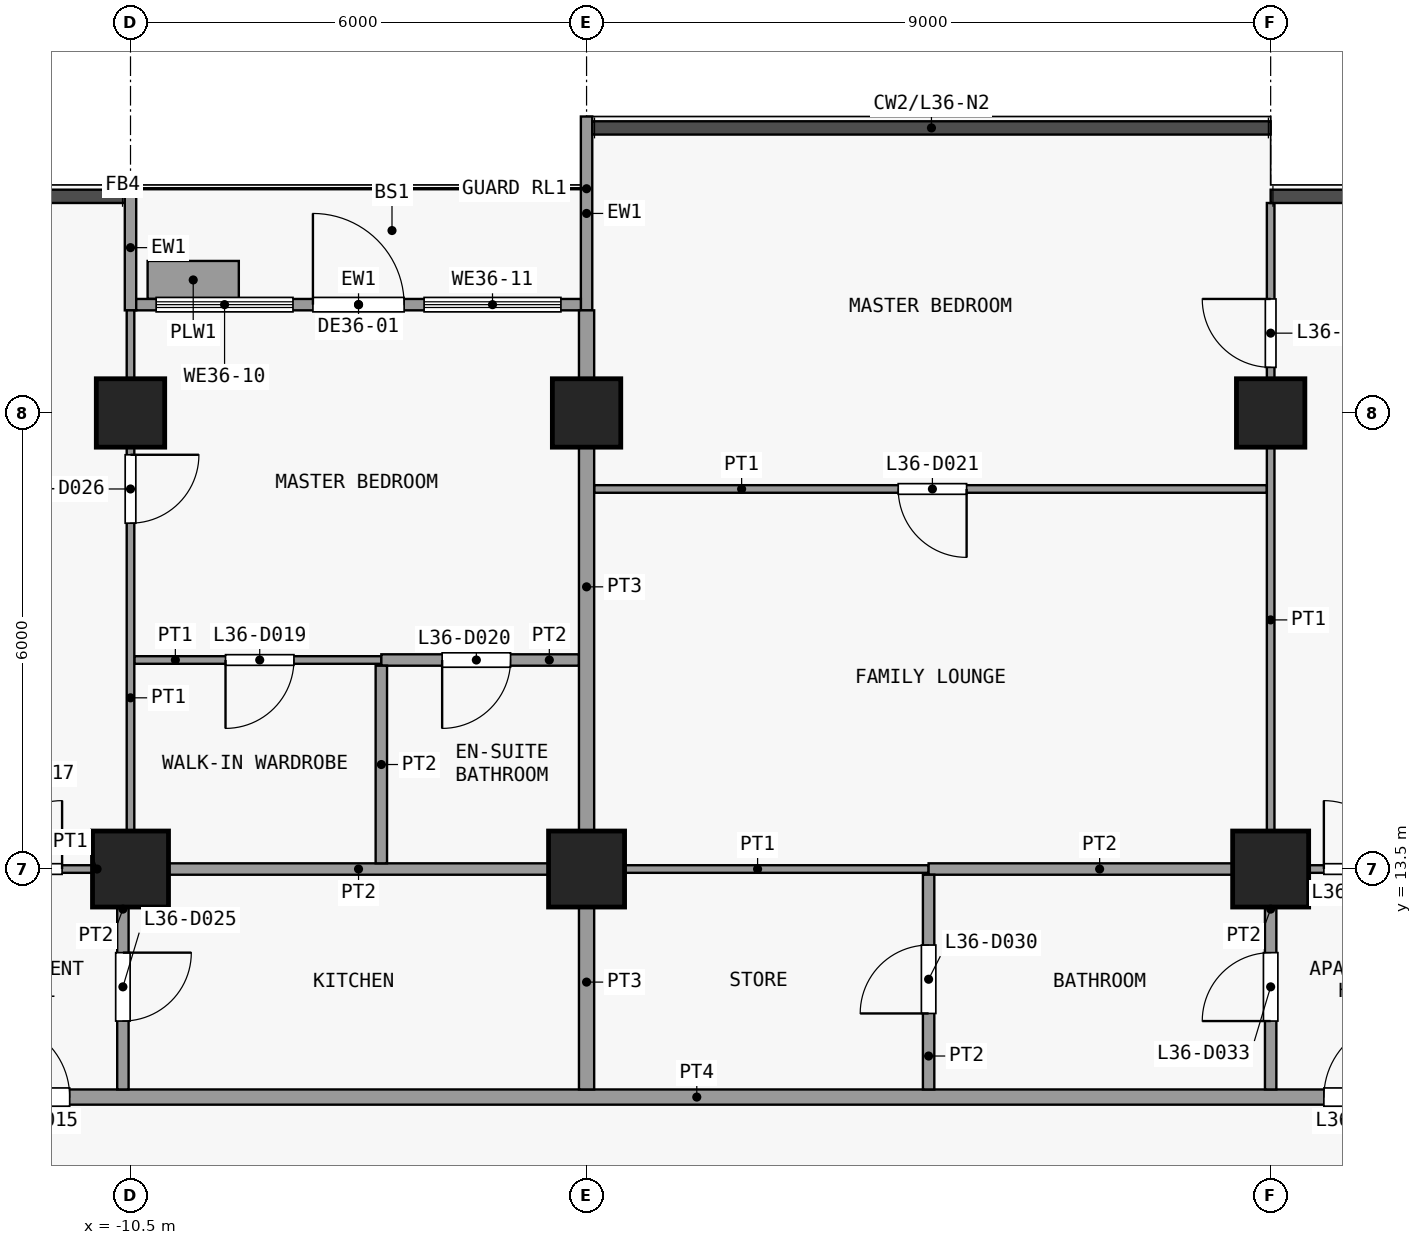
"""IFC4 building model, lengths in metres.
Left out: names, types, materials, properties, quantities, classifications, styles, units other than length and angle.
Written with IfcOpenShell. Run it as: python <this file> out.ifc"""

import sys

from ifc_helpers import new_model, si_unit, direction, frame, frame_2d, origin, origin_2d, place, context, subcontext, project, spatial, rectangle, extrude, element, fill, save


model = new_model("IFC4")
c1 = context("Model", 3, precision=1e-05, world=origin(), true_north=direction((0.0, 1.0)))
c2 = subcontext(c1, "Body", "Model", "MODEL_VIEW")
j1 = project(units=[si_unit("LENGTHUNIT", "METRE"), si_unit("PLANEANGLEUNIT", "RADIAN")], contexts=[c1])
p1 = place(None, origin())
s1 = spatial("IfcSite", under=j1, at=p1, CompositionType="ELEMENT")
p2 = place(p1, origin())
s2 = spatial("IfcBuilding", under=s1, at=p2, CompositionType="ELEMENT")
p3 = place(p2, frame((0.0, 0.0, 149.3)))
s3 = spatial("IfcBuildingStorey", under=s2, at=p3, CompositionType="ELEMENT", Elevation=149.3)
p4 = place(p3, frame((-10.5, 13.5, 0.0), z_axis=(0.0, 0.0, 1.0), x_axis=(1.0, 0.0, 0.0)))
e1 = element("IfcColumn", 1, at=p4, inside=s3, PredefinedType="COLUMN", context=c2, shape_type="SweptSolid", body=[
    extrude(rectangle(XDim=1.0, YDim=1.0, at=origin_2d()), origin(), (0.0, 0.0, 1.0), 3.6),
])
p5 = place(p3, frame((-10.5, 19.5, 0.0), z_axis=(0.0, 0.0, 1.0), x_axis=(1.0, 0.0, 0.0)))
e2 = element("IfcColumn", 2, at=p5, inside=s3, PredefinedType="COLUMN", context=c2, shape_type="SweptSolid", body=[
    extrude(rectangle(XDim=0.9, YDim=0.9, at=origin_2d()), origin(), (0.0, 0.0, 1.0), 3.6),
])
p6 = place(p3, frame((-4.5, 13.5, 0.0), z_axis=(0.0, 0.0, 1.0), x_axis=(1.0, 0.0, 0.0)))
e3 = element("IfcColumn", 3, at=p6, inside=s3, PredefinedType="COLUMN", context=c2, shape_type="SweptSolid", body=[
    extrude(rectangle(XDim=1.0, YDim=1.0, at=origin_2d()), origin(), (0.0, 0.0, 1.0), 3.6),
])
p7 = place(p3, frame((-4.5, 19.5, 0.0), z_axis=(0.0, 0.0, 1.0), x_axis=(1.0, 0.0, 0.0)))
e4 = element("IfcColumn", 4, at=p7, inside=s3, PredefinedType="COLUMN", context=c2, shape_type="SweptSolid", body=[
    extrude(rectangle(XDim=0.9, YDim=0.9, at=origin_2d()), origin(), (0.0, 0.0, 1.0), 3.6),
])
p8 = place(p3, frame((4.5, 13.5, 0.0), z_axis=(0.0, 0.0, 1.0), x_axis=(1.0, 0.0, 0.0)))
e5 = element("IfcColumn", 5, at=p8, inside=s3, PredefinedType="COLUMN", context=c2, shape_type="SweptSolid", body=[
    extrude(rectangle(XDim=1.0, YDim=1.0, at=origin_2d()), origin(), (0.0, 0.0, 1.0), 3.6),
])
p9 = place(p3, frame((4.5, 19.5, 0.0), z_axis=(0.0, 0.0, 1.0), x_axis=(1.0, 0.0, 0.0)))
e6 = element("IfcColumn", 6, at=p9, inside=s3, PredefinedType="COLUMN", context=c2, shape_type="SweptSolid", body=[
    extrude(rectangle(XDim=0.9, YDim=0.9, at=origin_2d()), origin(), (0.0, 0.0, 1.0), 3.6),
])
p10 = place(p3, frame((-10.5, 20.85, 0.0), z_axis=(0.0, 0.0, 1.0), x_axis=(0.0, 1.0, 0.0)))
e7 = element("IfcWall", 7, at=p10, inside=s3, PredefinedType="SOLIDWALL", context=c2, shape_type="SweptSolid", body=[
    extrude(rectangle(XDim=1.65, YDim=0.15, at=frame_2d((0.825, 0.0))), origin(), (0.0, 0.0, 1.0), 3.3),
])
p11 = place(p3, frame((-4.5, 20.85, 0.0), z_axis=(0.0, 0.0, 1.0), x_axis=(0.0, 1.0, 0.0)))
e8 = element("IfcWall", 8, at=p11, inside=s3, PredefinedType="SOLIDWALL", context=c2, shape_type="SweptSolid", body=[
    extrude(rectangle(XDim=2.55, YDim=0.15, at=frame_2d((1.275, 0.0))), origin(), (0.0, 0.0, 1.0), 3.3),
])
p12 = place(p3, frame((-10.425, 20.925, 0.0), z_axis=(0.0, 0.0, 1.0), x_axis=(1.0, 0.0, 0.0)))
e9 = element("IfcWall", 9, at=p12, inside=s3, PredefinedType="SOLIDWALL", context=c2, shape_type="SweptSolid", body=[
    extrude(rectangle(XDim=5.85, YDim=0.15, at=frame_2d((2.925, 0.0))), origin(), (0.0, 0.0, 1.0), 3.3),
])
p13 = place(p12, frame((2.325, 0.0, 0.0)))
e10 = element("IfcOpeningElement", 10, at=p13, cuts=e9, PredefinedType="OPENING", context=c2, shape_type="SweptSolid", body=[
    extrude(rectangle(XDim=1.2, YDim=2.4, at=frame_2d((0.6, 1.2))), frame((0.0, 0.085, 0.0), z_axis=(0.0, -1.0, 0.0), x_axis=(1.0, 0.0, 0.0)), (0.0, 0.0, 1.0), 0.17),
])
p14 = place(p12, frame((0.262, 0.0, 0.9)))
e11 = element("IfcOpeningElement", 11, at=p14, cuts=e9, PredefinedType="OPENING", context=c2, shape_type="SweptSolid", body=[
    extrude(rectangle(XDim=1.8, YDim=2.1, at=frame_2d((0.9, 1.05))), frame((0.0, 0.085, 0.0), z_axis=(0.0, -1.0, 0.0), x_axis=(1.0, 0.0, 0.0)), (0.0, 0.0, 1.0), 0.17),
])
p15 = place(p12, frame((3.788, 0.0, 0.9)))
e12 = element("IfcOpeningElement", 12, at=p15, cuts=e9, PredefinedType="OPENING", context=c2, shape_type="SweptSolid", body=[
    extrude(rectangle(XDim=1.8, YDim=2.1, at=frame_2d((0.9, 1.05))), frame((0.0, 0.085, 0.0), z_axis=(0.0, -1.0, 0.0), x_axis=(1.0, 0.0, 0.0)), (0.0, 0.0, 1.0), 0.17),
])
p16 = place(p3, frame((-10.275, 21.25, 0.0), z_axis=(0.0, 0.0, 1.0), x_axis=(1.0, 0.0, 0.0)))
e13 = element("IfcWall", 13, at=p16, inside=s3, PredefinedType="USERDEFINED", context=c2, shape_type="SweptSolid", body=[
    extrude(rectangle(XDim=1.2, YDim=0.5, at=frame_2d((0.6, 0.0))), origin(), (0.0, 0.0, 1.0), 0.9),
])
p17 = place(p3, frame((-17.85, 10.5, 0.0), z_axis=(0.0, 0.0, 1.0), x_axis=(1.0, 0.0, 0.0)))
e14 = element("IfcWall", 14, at=p17, inside=s3, PredefinedType="PARTITIONING", context=c2, shape_type="SweptSolid", body=[
    extrude(rectangle(XDim=37.2, YDim=0.2, at=frame_2d((18.6, 0.0))), origin(), (0.0, 0.0, 1.0), 3.3),
])
p18 = place(p17, frame((5.55, 0.0, 0.0)))
e15 = element("IfcOpeningElement", 15, at=p18, cuts=e14, PredefinedType="OPENING", context=c2, shape_type="SweptSolid", body=[
    extrude(rectangle(XDim=1.0, YDim=2.1, at=frame_2d((0.5, 1.05))), frame((0.0, 0.11, 0.0), z_axis=(0.0, -1.0, 0.0), x_axis=(1.0, 0.0, 0.0)), (0.0, 0.0, 1.0), 0.22),
])
p19 = place(p17, frame((23.05, 0.0, 0.0)))
e16 = element("IfcOpeningElement", 16, at=p19, cuts=e14, PredefinedType="OPENING", context=c2, shape_type="SweptSolid", body=[
    extrude(rectangle(XDim=1.0, YDim=2.1, at=frame_2d((0.5, 1.05))), frame((0.0, 0.11, 0.0), z_axis=(0.0, -1.0, 0.0), x_axis=(1.0, 0.0, 0.0)), (0.0, 0.0, 1.0), 0.22),
])
p20 = place(p3, frame((-13.0, 13.5, 0.0), z_axis=(0.0, 0.0, 1.0), x_axis=(1.0, 0.0, 0.0)))
e17 = element("IfcWall", 17, at=p20, inside=s3, PredefinedType="PARTITIONING", context=c2, shape_type="SweptSolid", body=[
    extrude(rectangle(XDim=2.4, YDim=0.1, at=frame_2d((1.2, 0.0))), origin(), (0.0, 0.0, 1.0), 3.3),
])
p21 = place(p20, frame((0.7, 0.0, 0.0)))
e18 = element("IfcOpeningElement", 18, at=p21, cuts=e17, PredefinedType="OPENING", context=c2, shape_type="SweptSolid", body=[
    extrude(rectangle(XDim=0.9, YDim=2.1, at=frame_2d((0.45, 1.05))), frame((0.0, 0.06, 0.0), z_axis=(0.0, -1.0, 0.0), x_axis=(1.0, 0.0, 0.0)), (0.0, 0.0, 1.0), 0.12),
])
p22 = place(p3, frame((-4.5, 13.5, 0.0), z_axis=(0.0, 0.0, 1.0), x_axis=(1.0, 0.0, 0.0)))
e19 = element("IfcWall", 19, at=p22, inside=s3, PredefinedType="PARTITIONING", context=c2, shape_type="SweptSolid", body=[
    extrude(rectangle(XDim=4.5, YDim=0.1, at=frame_2d((2.25, 0.0))), origin(), (0.0, 0.0, 1.0), 3.3),
])
p23 = place(p3, frame((4.5, 13.5, 0.0), z_axis=(0.0, 0.0, 1.0), x_axis=(1.0, 0.0, 0.0)))
e20 = element("IfcWall", 20, at=p23, inside=s3, PredefinedType="PARTITIONING", context=c2, shape_type="SweptSolid", body=[
    extrude(rectangle(XDim=2.4, YDim=0.1, at=frame_2d((1.2, 0.0))), origin(), (0.0, 0.0, 1.0), 3.3),
])
p24 = place(p23, frame((0.7, 0.0, 0.0)))
e21 = element("IfcOpeningElement", 21, at=p24, cuts=e20, PredefinedType="OPENING", context=c2, shape_type="SweptSolid", body=[
    extrude(rectangle(XDim=0.9, YDim=2.1, at=frame_2d((0.45, 1.05))), frame((0.0, 0.06, 0.0), z_axis=(0.0, -1.0, 0.0), x_axis=(1.0, 0.0, 0.0)), (0.0, 0.0, 1.0), 0.12),
])
p25 = place(p3, frame((-10.5, 13.5, 0.0), z_axis=(0.0, 0.0, 1.0), x_axis=(1.0, 0.0, 0.0)))
e22 = element("IfcWall", 22, at=p25, inside=s3, PredefinedType="PARTITIONING", context=c2, shape_type="SweptSolid", body=[
    extrude(rectangle(XDim=6.0, YDim=0.15, at=frame_2d((3.0, 0.0))), origin(), (0.0, 0.0, 1.0), 3.3),
])
p26 = place(p3, frame((0.0, 13.5, 0.0), z_axis=(0.0, 0.0, 1.0), x_axis=(1.0, 0.0, 0.0)))
e23 = element("IfcWall", 23, at=p26, inside=s3, PredefinedType="PARTITIONING", context=c2, shape_type="SweptSolid", body=[
    extrude(rectangle(XDim=4.5, YDim=0.15, at=frame_2d((2.25, 0.0))), origin(), (0.0, 0.0, 1.0), 3.3),
])
p27 = place(p3, frame((-10.45, 16.25, 0.0), z_axis=(0.0, 0.0, 1.0), x_axis=(1.0, 0.0, 0.0)))
e24 = element("IfcWall", 24, at=p27, inside=s3, PredefinedType="PARTITIONING", context=c2, shape_type="SweptSolid", body=[
    extrude(rectangle(XDim=3.25, YDim=0.1, at=frame_2d((1.625, 0.0))), origin(), (0.0, 0.0, 1.0), 3.3),
])
p28 = place(p27, frame((1.2, 0.0, 0.0)))
e25 = element("IfcOpeningElement", 25, at=p28, cuts=e24, PredefinedType="OPENING", context=c2, shape_type="SweptSolid", body=[
    extrude(rectangle(XDim=0.9, YDim=2.1, at=frame_2d((0.45, 1.05))), frame((0.0, 0.06, 0.0), z_axis=(0.0, -1.0, 0.0), x_axis=(1.0, 0.0, 0.0)), (0.0, 0.0, 1.0), 0.12),
])
p29 = place(p3, frame((-7.2, 16.25, 0.0), z_axis=(0.0, 0.0, 1.0), x_axis=(1.0, 0.0, 0.0)))
e26 = element("IfcWall", 26, at=p29, inside=s3, PredefinedType="PARTITIONING", context=c2, shape_type="SweptSolid", body=[
    extrude(rectangle(XDim=2.6, YDim=0.15, at=frame_2d((1.3, 0.0))), origin(), (0.0, 0.0, 1.0), 3.3),
])
p30 = place(p29, frame((0.8, 0.0, 0.0)))
e27 = element("IfcOpeningElement", 27, at=p30, cuts=e26, PredefinedType="OPENING", context=c2, shape_type="SweptSolid", body=[
    extrude(rectangle(XDim=0.9, YDim=2.1, at=frame_2d((0.45, 1.05))), frame((0.0, 0.085, 0.0), z_axis=(0.0, -1.0, 0.0), x_axis=(1.0, 0.0, 0.0)), (0.0, 0.0, 1.0), 0.17),
])
p31 = place(p3, frame((-4.4, 18.5, 0.0), z_axis=(0.0, 0.0, 1.0), x_axis=(1.0, 0.0, 0.0)))
e28 = element("IfcWall", 28, at=p31, inside=s3, PredefinedType="PARTITIONING", context=c2, shape_type="SweptSolid", body=[
    extrude(rectangle(XDim=8.85, YDim=0.1, at=frame_2d((4.425, 0.0))), origin(), (0.0, 0.0, 1.0), 3.3),
])
p32 = place(p31, frame((4.0, 0.0, 0.0)))
e29 = element("IfcOpeningElement", 29, at=p32, cuts=e28, PredefinedType="OPENING", context=c2, shape_type="SweptSolid", body=[
    extrude(rectangle(XDim=0.9, YDim=2.1, at=frame_2d((0.45, 1.05))), frame((0.0, 0.06, 0.0), z_axis=(0.0, -1.0, 0.0), x_axis=(1.0, 0.0, 0.0)), (0.0, 0.0, 1.0), 0.12),
])
p33 = place(p3, frame((-10.6, 10.6, 0.0), z_axis=(0.0, 0.0, 1.0), x_axis=(0.0, 1.0, 0.0)))
e30 = element("IfcWall", 30, at=p33, inside=s3, PredefinedType="PARTITIONING", context=c2, shape_type="SweptSolid", body=[
    extrude(rectangle(XDim=2.825, YDim=0.15, at=frame_2d((1.413, 0.0))), origin(), (0.0, 0.0, 1.0), 3.3),
])
p34 = place(p33, frame((0.9, 0.0, 0.0)))
e31 = element("IfcOpeningElement", 31, at=p34, cuts=e30, PredefinedType="OPENING", context=c2, shape_type="SweptSolid", body=[
    extrude(rectangle(XDim=0.9, YDim=2.1, at=frame_2d((0.45, 1.05))), frame((0.0, 0.085, 0.0), z_axis=(0.0, -1.0, 0.0), x_axis=(1.0, 0.0, 0.0)), (0.0, 0.0, 1.0), 0.17),
])
p35 = place(p3, frame((-10.5, 13.575, 0.0), z_axis=(0.0, 0.0, 1.0), x_axis=(0.0, 1.0, 0.0)))
e32 = element("IfcWall", 32, at=p35, inside=s3, PredefinedType="PARTITIONING", context=c2, shape_type="SweptSolid", body=[
    extrude(rectangle(XDim=7.275, YDim=0.1, at=frame_2d((3.638, 0.0))), origin(), (0.0, 0.0, 1.0), 3.3),
])
p36 = place(p35, frame((4.475, 0.0, 0.0)))
e33 = element("IfcOpeningElement", 33, at=p36, cuts=e32, PredefinedType="OPENING", context=c2, shape_type="SweptSolid", body=[
    extrude(rectangle(XDim=0.9, YDim=2.1, at=frame_2d((0.45, 1.05))), frame((0.0, 0.06, 0.0), z_axis=(0.0, -1.0, 0.0), x_axis=(1.0, 0.0, 0.0)), (0.0, 0.0, 1.0), 0.12),
])
p37 = place(p3, frame((-7.2, 13.575, 0.0), z_axis=(0.0, 0.0, 1.0), x_axis=(0.0, 1.0, 0.0)))
e34 = element("IfcWall", 34, at=p37, inside=s3, PredefinedType="PARTITIONING", context=c2, shape_type="SweptSolid", body=[
    extrude(rectangle(XDim=2.6, YDim=0.15, at=frame_2d((1.3, 0.0))), origin(), (0.0, 0.0, 1.0), 3.3),
])
p38 = place(p3, frame((-4.5, 10.6, 0.0), z_axis=(0.0, 0.0, 1.0), x_axis=(0.0, 1.0, 0.0)))
e35 = element("IfcWall", 35, at=p38, inside=s3, PredefinedType="PARTITIONING", context=c2, shape_type="SweptSolid", body=[
    extrude(rectangle(XDim=2.825, YDim=0.2, at=frame_2d((1.413, 0.0))), origin(), (0.0, 0.0, 1.0), 3.3),
])
p39 = place(p3, frame((-4.5, 13.575, 0.0), z_axis=(0.0, 0.0, 1.0), x_axis=(0.0, 1.0, 0.0)))
e36 = element("IfcWall", 36, at=p39, inside=s3, PredefinedType="PARTITIONING", context=c2, shape_type="SweptSolid", body=[
    extrude(rectangle(XDim=7.275, YDim=0.2, at=frame_2d((3.638, 0.0))), origin(), (0.0, 0.0, 1.0), 3.3),
])
p40 = place(p3, frame((0.0, 10.6, 0.0), z_axis=(0.0, 0.0, 1.0), x_axis=(0.0, 1.0, 0.0)))
e37 = element("IfcWall", 37, at=p40, inside=s3, PredefinedType="PARTITIONING", context=c2, shape_type="SweptSolid", body=[
    extrude(rectangle(XDim=2.825, YDim=0.15, at=frame_2d((1.413, 0.0))), origin(), (0.0, 0.0, 1.0), 3.3),
])
p41 = place(p40, frame((1.0, 0.0, 0.0)))
e38 = element("IfcOpeningElement", 38, at=p41, cuts=e37, PredefinedType="OPENING", context=c2, shape_type="SweptSolid", body=[
    extrude(rectangle(XDim=0.9, YDim=2.1, at=frame_2d((0.45, 1.05))), frame((0.0, 0.085, 0.0), z_axis=(0.0, -1.0, 0.0), x_axis=(1.0, 0.0, 0.0)), (0.0, 0.0, 1.0), 0.17),
])
p42 = place(p3, frame((4.5, 13.575, 0.0), z_axis=(0.0, 0.0, 1.0), x_axis=(0.0, 1.0, 0.0)))
e39 = element("IfcWall", 39, at=p42, inside=s3, PredefinedType="PARTITIONING", context=c2, shape_type="SweptSolid", body=[
    extrude(rectangle(XDim=8.688, YDim=0.1, at=frame_2d((4.344, 0.0))), origin(), (0.0, 0.0, 1.0), 3.3),
])
p43 = place(p42, frame((6.525, 0.0, 0.0)))
e40 = element("IfcOpeningElement", 40, at=p43, cuts=e39, PredefinedType="OPENING", context=c2, shape_type="SweptSolid", body=[
    extrude(rectangle(XDim=0.9, YDim=2.1, at=frame_2d((0.45, 1.05))), frame((0.0, 0.06, 0.0), z_axis=(0.0, -1.0, 0.0), x_axis=(1.0, 0.0, 0.0)), (0.0, 0.0, 1.0), 0.12),
])
p44 = place(p3, frame((4.5, 10.6, 0.0), z_axis=(0.0, 0.0, 1.0), x_axis=(0.0, 1.0, 0.0)))
e41 = element("IfcWall", 41, at=p44, inside=s3, PredefinedType="PARTITIONING", context=c2, shape_type="SweptSolid", body=[
    extrude(rectangle(XDim=2.825, YDim=0.15, at=frame_2d((1.413, 0.0))), origin(), (0.0, 0.0, 1.0), 3.3),
])
p45 = place(p44, frame((0.9, 0.0, 0.0)))
e42 = element("IfcOpeningElement", 42, at=p45, cuts=e41, PredefinedType="OPENING", context=c2, shape_type="SweptSolid", body=[
    extrude(rectangle(XDim=0.9, YDim=2.1, at=frame_2d((0.45, 1.05))), frame((0.0, 0.085, 0.0), z_axis=(0.0, -1.0, 0.0), x_axis=(1.0, 0.0, 0.0)), (0.0, 0.0, 1.0), 0.17),
])
p46 = place(p13, origin())
e43 = element("IfcDoor", 43, at=p46, inside=s3, OperationType="SINGLE_SWING_LEFT", PredefinedType="DOOR", context=c2, shape_type="SweptSolid", body=[
    extrude(rectangle(XDim=1.2, YDim=2.4, at=frame_2d((0.6, 1.2))), frame((0.0, 0.025, 0.0), z_axis=(0.0, -1.0, 0.0), x_axis=(1.0, 0.0, 0.0)), (0.0, 0.0, 1.0), 0.05),
])
fill(e10, e43)
p47 = place(p14, origin())
e44 = element("IfcWindow", 44, at=p47, inside=s3, PartitioningType="SINGLE_PANEL", PredefinedType="WINDOW", context=c2, shape_type="SweptSolid", body=[
    extrude(rectangle(XDim=1.8, YDim=2.1, at=frame_2d((0.9, 1.05))), frame((0.0, 0.03, 0.0), z_axis=(0.0, -1.0, 0.0), x_axis=(1.0, 0.0, 0.0)), (0.0, 0.0, 1.0), 0.06),
])
fill(e11, e44)
p48 = place(p15, origin())
e45 = element("IfcWindow", 45, at=p48, inside=s3, PartitioningType="SINGLE_PANEL", PredefinedType="WINDOW", context=c2, shape_type="SweptSolid", body=[
    extrude(rectangle(XDim=1.8, YDim=2.1, at=frame_2d((0.9, 1.05))), frame((0.0, 0.03, 0.0), z_axis=(0.0, -1.0, 0.0), x_axis=(1.0, 0.0, 0.0)), (0.0, 0.0, 1.0), 0.06),
])
fill(e12, e45)
p49 = place(p18, origin())
e46 = element("IfcDoor", 46, at=p49, inside=s3, OperationType="SINGLE_SWING_RIGHT", PredefinedType="DOOR", context=c2, shape_type="SweptSolid", body=[
    extrude(rectangle(XDim=1.0, YDim=2.1, at=frame_2d((0.5, 1.05))), frame((0.0, 0.025, 0.0), z_axis=(0.0, -1.0, 0.0), x_axis=(1.0, 0.0, 0.0)), (0.0, 0.0, 1.0), 0.05),
])
fill(e15, e46)
p50 = place(p19, origin())
e47 = element("IfcDoor", 47, at=p50, inside=s3, OperationType="SINGLE_SWING_LEFT", PredefinedType="DOOR", context=c2, shape_type="SweptSolid", body=[
    extrude(rectangle(XDim=1.0, YDim=2.1, at=frame_2d((0.5, 1.05))), frame((0.0, 0.025, 0.0), z_axis=(0.0, -1.0, 0.0), x_axis=(1.0, 0.0, 0.0)), (0.0, 0.0, 1.0), 0.05),
])
fill(e16, e47)
p51 = place(p21, origin())
e48 = element("IfcDoor", 48, at=p51, inside=s3, OperationType="SINGLE_SWING_LEFT", PredefinedType="DOOR", context=c2, shape_type="SweptSolid", body=[
    extrude(rectangle(XDim=0.9, YDim=2.1, at=frame_2d((0.45, 1.05))), frame((0.0, 0.025, 0.0), z_axis=(0.0, -1.0, 0.0), x_axis=(1.0, 0.0, 0.0)), (0.0, 0.0, 1.0), 0.05),
])
fill(e18, e48)
p52 = place(p24, origin())
e49 = element("IfcDoor", 49, at=p52, inside=s3, OperationType="SINGLE_SWING_RIGHT", PredefinedType="DOOR", context=c2, shape_type="SweptSolid", body=[
    extrude(rectangle(XDim=0.9, YDim=2.1, at=frame_2d((0.45, 1.05))), frame((0.0, 0.025, 0.0), z_axis=(0.0, -1.0, 0.0), x_axis=(1.0, 0.0, 0.0)), (0.0, 0.0, 1.0), 0.05),
])
fill(e21, e49)
p53 = place(p28, origin())
e50 = element("IfcDoor", 50, at=p53, inside=s3, OperationType="SINGLE_SWING_LEFT", PredefinedType="DOOR", context=c2, shape_type="SweptSolid", body=[
    extrude(rectangle(XDim=0.9, YDim=2.1, at=frame_2d((0.45, 1.05))), frame((0.0, 0.025, 0.0), z_axis=(0.0, -1.0, 0.0), x_axis=(1.0, 0.0, 0.0)), (0.0, 0.0, 1.0), 0.05),
])
fill(e25, e50)
p54 = place(p30, origin())
e51 = element("IfcDoor", 51, at=p54, inside=s3, OperationType="SINGLE_SWING_LEFT", PredefinedType="DOOR", context=c2, shape_type="SweptSolid", body=[
    extrude(rectangle(XDim=0.9, YDim=2.1, at=frame_2d((0.45, 1.05))), frame((0.0, 0.025, 0.0), z_axis=(0.0, -1.0, 0.0), x_axis=(1.0, 0.0, 0.0)), (0.0, 0.0, 1.0), 0.05),
])
fill(e27, e51)
p55 = place(p32, origin())
e52 = element("IfcDoor", 52, at=p55, inside=s3, OperationType="SINGLE_SWING_RIGHT", PredefinedType="DOOR", context=c2, shape_type="SweptSolid", body=[
    extrude(rectangle(XDim=0.9, YDim=2.1, at=frame_2d((0.45, 1.05))), frame((0.0, 0.025, 0.0), z_axis=(0.0, -1.0, 0.0), x_axis=(1.0, 0.0, 0.0)), (0.0, 0.0, 1.0), 0.05),
])
fill(e29, e52)
p56 = place(p34, origin())
e53 = element("IfcDoor", 53, at=p56, inside=s3, OperationType="SINGLE_SWING_RIGHT", PredefinedType="DOOR", context=c2, shape_type="SweptSolid", body=[
    extrude(rectangle(XDim=0.9, YDim=2.1, at=frame_2d((0.45, 1.05))), frame((0.0, 0.025, 0.0), z_axis=(0.0, -1.0, 0.0), x_axis=(1.0, 0.0, 0.0)), (0.0, 0.0, 1.0), 0.05),
])
fill(e31, e53)
p57 = place(p36, origin())
e54 = element("IfcDoor", 54, at=p57, inside=s3, OperationType="SINGLE_SWING_RIGHT", PredefinedType="DOOR", context=c2, shape_type="SweptSolid", body=[
    extrude(rectangle(XDim=0.9, YDim=2.1, at=frame_2d((0.45, 1.05))), frame((0.0, 0.025, 0.0), z_axis=(0.0, -1.0, 0.0), x_axis=(1.0, 0.0, 0.0)), (0.0, 0.0, 1.0), 0.05),
])
fill(e33, e54)
p58 = place(p41, origin())
e55 = element("IfcDoor", 55, at=p58, inside=s3, OperationType="SINGLE_SWING_RIGHT", PredefinedType="DOOR", context=c2, shape_type="SweptSolid", body=[
    extrude(rectangle(XDim=0.9, YDim=2.1, at=frame_2d((0.45, 1.05))), frame((0.0, 0.025, 0.0), z_axis=(0.0, -1.0, 0.0), x_axis=(1.0, 0.0, 0.0)), (0.0, 0.0, 1.0), 0.05),
])
fill(e38, e55)
p59 = place(p43, origin())
e56 = element("IfcDoor", 56, at=p59, inside=s3, OperationType="SINGLE_SWING_LEFT", PredefinedType="DOOR", context=c2, shape_type="SweptSolid", body=[
    extrude(rectangle(XDim=0.9, YDim=2.1, at=frame_2d((0.45, 1.05))), frame((0.0, 0.025, 0.0), z_axis=(0.0, -1.0, 0.0), x_axis=(1.0, 0.0, 0.0)), (0.0, 0.0, 1.0), 0.05),
])
fill(e40, e56)
p60 = place(p45, origin())
e57 = element("IfcDoor", 57, at=p60, inside=s3, OperationType="SINGLE_SWING_RIGHT", PredefinedType="DOOR", context=c2, shape_type="SweptSolid", body=[
    extrude(rectangle(XDim=0.9, YDim=2.1, at=frame_2d((0.45, 1.05))), frame((0.0, 0.025, 0.0), z_axis=(0.0, -1.0, 0.0), x_axis=(1.0, 0.0, 0.0)), (0.0, 0.0, 1.0), 0.05),
])
fill(e42, e57)
save(model, sys.argv[1])
